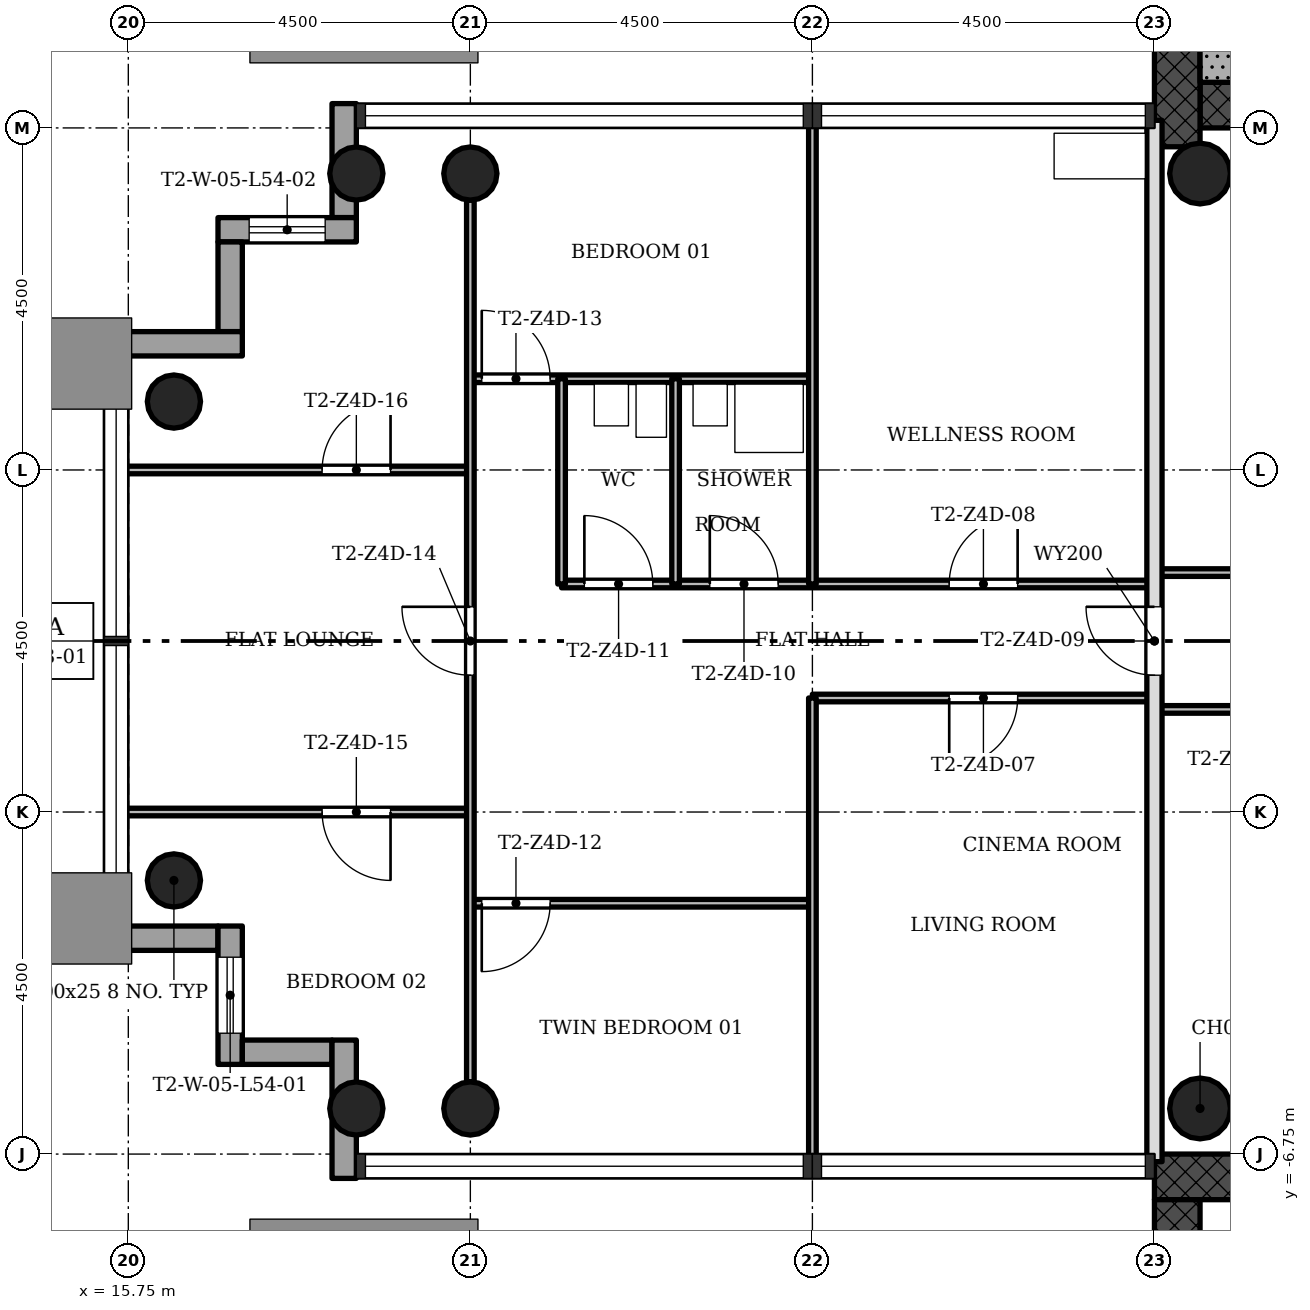
"""IFC4 building model, lengths in metres.
Left out: names, types, materials, properties, quantities, classifications, styles, units other than length and angle.
Written with IfcOpenShell. Run it as: python <this file> out.ifc"""

import sys

from ifc_helpers import new_model, si_unit, direction, frame, frame_2d, origin, origin_2d, place, context, subcontext, project, spatial, rectangle, hollow_circle, extrude, element, fill, save


model = new_model("IFC4")
c1 = context("Model", 3, precision=1e-05, world=origin(), true_north=direction((0.0, 1.0)))
c2 = subcontext(c1, "Body", "Model", "MODEL_VIEW")
j1 = project(units=[si_unit("LENGTHUNIT", "METRE"), si_unit("PLANEANGLEUNIT", "RADIAN")], contexts=[c1])
p1 = place(None, origin())
s1 = spatial("IfcSite", under=j1, at=p1, CompositionType="ELEMENT")
p2 = place(p1, origin())
s2 = spatial("IfcBuilding", under=s1, at=p2, CompositionType="ELEMENT")
p3 = place(p2, frame((0.0, 0.0, 196.0)))
s3 = spatial("IfcBuildingStorey", under=s2, at=p3, CompositionType="ELEMENT", Elevation=196.0)
p4 = place(p3, frame((29.85, 7.05, 0.0), z_axis=(0.0, 0.0, 1.0), x_axis=(1.0, 0.0, 0.0)))
e1 = element("IfcWall", 1, at=p4, inside=s3, PredefinedType="SHEAR", context=c2, shape_type="SweptSolid", body=[
    extrude(rectangle(XDim=12.9, YDim=0.6, at=frame_2d((6.45, 0.0))), origin(), (0.0, 0.0, 1.0), 3.4),
])
p5 = place(p4, frame((5.25, 0.0, 0.0)))
e2 = element("IfcOpeningElement", 2, at=p5, cuts=e1, PredefinedType="OPENING", context=c2, shape_type="SweptSolid", body=[
    extrude(rectangle(XDim=1.8, YDim=2.1, at=frame_2d((0.9, 1.05))), frame((0.0, 0.31, 0.0), z_axis=(0.0, -1.0, 0.0), x_axis=(1.0, 0.0, 0.0)), (0.0, 0.0, 1.0), 0.62),
])
p6 = place(p3, frame((29.55, 15.15, 0.0), z_axis=(0.0, 0.0, 1.0), x_axis=(0.0, -1.0, 0.0)))
e3 = element("IfcWall", 3, at=p6, inside=s3, PredefinedType="SHEAR", context=c2, shape_type="SweptSolid", body=[
    extrude(rectangle(XDim=8.648, YDim=0.6, at=frame_2d((4.324, 0.0))), origin(), (0.0, 0.0, 1.0), 3.4),
])
p7 = place(p3, frame((42.15, -7.05, 0.0), z_axis=(0.0, 0.0, 1.0), x_axis=(-1.0, 0.0, 0.0)))
e4 = element("IfcWall", 4, at=p7, inside=s3, PredefinedType="SHEAR", context=c2, shape_type="SweptSolid", body=[
    extrude(rectangle(XDim=12.9, YDim=0.6, at=frame_2d((6.45, 0.0))), origin(), (0.0, 0.0, 1.0), 3.4),
])
p8 = place(p7, frame((5.25, 0.0, 0.0)))
e5 = element("IfcOpeningElement", 5, at=p8, cuts=e4, PredefinedType="OPENING", context=c2, shape_type="SweptSolid", body=[
    extrude(rectangle(XDim=1.8, YDim=2.1, at=frame_2d((0.9, 1.05))), frame((0.0, 0.31, 0.0), z_axis=(0.0, -1.0, 0.0), x_axis=(1.0, 0.0, 0.0)), (0.0, 0.0, 1.0), 0.62),
])
p9 = place(p3, frame((29.55, -7.35, 0.0), z_axis=(0.0, 0.0, 1.0), x_axis=(0.0, -1.0, 0.0)))
e6 = element("IfcWall", 6, at=p9, inside=s3, PredefinedType="SHEAR", context=c2, shape_type="SweptSolid", body=[
    extrude(rectangle(XDim=8.4, YDim=0.6, at=frame_2d((4.2, 0.0))), origin(), (0.0, 0.0, 1.0), 3.4),
])
for number, where, z_axis, x_axis in (
    (7, (20.25, 6.15, 0.0), (0.0, 0.0, 1.0), (1.0, 0.0, 0.0)),
    (8, (20.25, -6.15, 0.0), (0.0, 0.0, 1.0), (1.0, 0.0, 0.0)),
    (9, (18.75, 6.15, 0.0), (0.0, 0.0, 1.0), (1.0, 0.0, 0.0)),
    (10, (18.75, -6.15, 0.0), (0.0, 0.0, 1.0), (1.0, 0.0, 0.0)),
    (11, (16.35, 3.15, 0.0), (0.0, 0.0, 1.0), (1.0, 0.0, 0.0)),
    (12, (16.35, -3.15, 0.0), (0.0, 0.0, 1.0), (1.0, 0.0, 0.0)),
):
    element("IfcColumn", number, at=place(p3, frame(where, z_axis=z_axis, x_axis=x_axis)), inside=s3, PredefinedType="COLUMN", context=c2, shape_type="SweptSolid", body=[
        extrude(hollow_circle(Radius=0.35, WallThickness=0.025, at=origin_2d()), origin(), (0.0, 0.0, 1.0), 3.4),
    ])
for number, where, z_axis, x_axis in (
    (13, (29.85, 6.15, 0.0), (0.0, 0.0, 1.0), (1.0, 0.0, 0.0)),
    (14, (29.85, -6.15, 0.0), (0.0, 0.0, 1.0), (1.0, 0.0, 0.0)),
):
    element("IfcColumn", number, at=place(p3, frame(where, z_axis=z_axis, x_axis=x_axis)), inside=s3, PredefinedType="COLUMN", context=c2, shape_type="SweptSolid", body=[
        extrude(hollow_circle(Radius=0.4, WallThickness=0.028, at=origin_2d()), origin(), (0.0, 0.0, 1.0), 3.4),
    ])
p10 = place(p3, frame((18.59, 7.07, -0.3), z_axis=(0.0, 0.0, 1.0), x_axis=(0.0, -1.0, 0.0)))
e15 = element("IfcWall", 15, at=p10, inside=s3, PredefinedType="STANDARD", context=c2, shape_type="SweptSolid", body=[
    extrude(rectangle(XDim=1.5, YDim=0.32, at=frame_2d((0.75, 0.0))), origin(), (0.0, 0.0, 1.0), 3.4),
])
p11 = place(p3, frame((18.75, 5.41, -0.3), z_axis=(0.0, 0.0, 1.0), x_axis=(-1.0, 0.0, 0.0)))
e16 = element("IfcWall", 16, at=p11, inside=s3, PredefinedType="STANDARD", context=c2, shape_type="SweptSolid", body=[
    extrude(rectangle(XDim=1.82, YDim=0.32, at=frame_2d((0.91, 0.0))), origin(), (0.0, 0.0, 1.0), 3.4),
])
p12 = place(p11, frame((0.41, 0.0, 1.2)))
e17 = element("IfcOpeningElement", 17, at=p12, cuts=e16, PredefinedType="OPENING", context=c2, shape_type="SweptSolid", body=[
    extrude(rectangle(XDim=1.0, YDim=1.5, at=frame_2d((0.5, 0.75))), frame((0.0, 0.17, 0.0), z_axis=(0.0, -1.0, 0.0), x_axis=(1.0, 0.0, 0.0)), (0.0, 0.0, 1.0), 0.34),
])
p13 = place(p3, frame((17.09, 5.25, -0.3), z_axis=(0.0, 0.0, 1.0), x_axis=(0.0, -1.0, 0.0)))
e18 = element("IfcWall", 18, at=p13, inside=s3, PredefinedType="STANDARD", context=c2, shape_type="SweptSolid", body=[
    extrude(rectangle(XDim=1.18, YDim=0.32, at=frame_2d((0.59, 0.0))), origin(), (0.0, 0.0, 1.0), 3.4),
])
p14 = place(p3, frame((17.25, 3.91, -0.3), z_axis=(0.0, 0.0, 1.0), x_axis=(-1.0, 0.0, 0.0)))
e19 = element("IfcWall", 19, at=p14, inside=s3, PredefinedType="STANDARD", context=c2, shape_type="SweptSolid", body=[
    extrude(rectangle(XDim=1.82, YDim=0.32, at=frame_2d((0.91, 0.0))), origin(), (0.0, 0.0, 1.0), 3.4),
])
p15 = place(p3, frame((15.43, -3.91, -0.3), z_axis=(0.0, 0.0, 1.0), x_axis=(1.0, 0.0, 0.0)))
e20 = element("IfcWall", 20, at=p15, inside=s3, PredefinedType="STANDARD", context=c2, shape_type="SweptSolid", body=[
    extrude(rectangle(XDim=1.5, YDim=0.32, at=frame_2d((0.75, 0.0))), origin(), (0.0, 0.0, 1.0), 3.4),
])
p16 = place(p3, frame((17.09, -3.75, -0.3), z_axis=(0.0, 0.0, 1.0), x_axis=(0.0, -1.0, 0.0)))
e21 = element("IfcWall", 21, at=p16, inside=s3, PredefinedType="STANDARD", context=c2, shape_type="SweptSolid", body=[
    extrude(rectangle(XDim=1.82, YDim=0.32, at=frame_2d((0.91, 0.0))), origin(), (0.0, 0.0, 1.0), 3.4),
])
p17 = place(p16, frame((0.41, 0.0, 1.2)))
e22 = element("IfcOpeningElement", 22, at=p17, cuts=e21, PredefinedType="OPENING", context=c2, shape_type="SweptSolid", body=[
    extrude(rectangle(XDim=1.0, YDim=1.5, at=frame_2d((0.5, 0.75))), frame((0.0, 0.17, 0.0), z_axis=(0.0, -1.0, 0.0), x_axis=(1.0, 0.0, 0.0)), (0.0, 0.0, 1.0), 0.34),
])
p18 = place(p3, frame((17.25, -5.41, -0.3), z_axis=(0.0, 0.0, 1.0), x_axis=(1.0, 0.0, 0.0)))
e23 = element("IfcWall", 23, at=p18, inside=s3, PredefinedType="STANDARD", context=c2, shape_type="SweptSolid", body=[
    extrude(rectangle(XDim=1.18, YDim=0.32, at=frame_2d((0.59, 0.0))), origin(), (0.0, 0.0, 1.0), 3.4),
])
p19 = place(p3, frame((18.59, -5.25, -0.3), z_axis=(0.0, 0.0, 1.0), x_axis=(0.0, -1.0, 0.0)))
e24 = element("IfcWall", 24, at=p19, inside=s3, PredefinedType="STANDARD", context=c2, shape_type="SweptSolid", body=[
    extrude(rectangle(XDim=1.82, YDim=0.32, at=frame_2d((0.91, 0.0))), origin(), (0.0, 0.0, 1.0), 3.4),
])
p20 = place(p3, frame((24.75, -3.45, 0.0), z_axis=(0.0, 0.0, 1.0), x_axis=(-1.0, 0.0, 0.0)))
e25 = element("IfcWall", 25, at=p20, inside=s3, PredefinedType="PARTITIONING", context=c2, shape_type="SweptSolid", body=[
    extrude(rectangle(XDim=4.5, YDim=0.1, at=frame_2d((2.25, 0.0))), origin(), (0.0, 0.0, 1.0), 3.0),
])
p21 = place(p20, frame((3.45, 0.0, 0.0)))
e26 = element("IfcOpeningElement", 26, at=p21, cuts=e25, PredefinedType="OPENING", context=c2, shape_type="SweptSolid", body=[
    extrude(rectangle(XDim=0.9, YDim=2.1, at=frame_2d((0.45, 1.05))), frame((0.0, 0.06, 0.0), z_axis=(0.0, -1.0, 0.0), x_axis=(1.0, 0.0, 0.0)), (0.0, 0.0, 1.0), 0.12),
])
p22 = place(p3, frame((20.25, -2.25, 0.0), z_axis=(0.0, 0.0, 1.0), x_axis=(-1.0, 0.0, 0.0)))
e27 = element("IfcWall", 27, at=p22, inside=s3, PredefinedType="PARTITIONING", context=c2, shape_type="SweptSolid", body=[
    extrude(rectangle(XDim=4.6, YDim=0.1, at=frame_2d((2.3, 0.0))), origin(), (0.0, 0.0, 1.0), 3.0),
])
p23 = place(p22, frame((1.05, 0.0, 0.0)))
e28 = element("IfcOpeningElement", 28, at=p23, cuts=e27, PredefinedType="OPENING", context=c2, shape_type="SweptSolid", body=[
    extrude(rectangle(XDim=0.9, YDim=2.1, at=frame_2d((0.45, 1.05))), frame((0.0, 0.06, 0.0), z_axis=(0.0, -1.0, 0.0), x_axis=(1.0, 0.0, 0.0)), (0.0, 0.0, 1.0), 0.12),
])
p24 = place(p3, frame((31.5, -0.9, 0.0), z_axis=(0.0, 0.0, 1.0), x_axis=(-1.0, 0.0, 0.0)))
e29 = element("IfcWall", 29, at=p24, inside=s3, PredefinedType="PARTITIONING", context=c2, shape_type="SweptSolid", body=[
    extrude(rectangle(XDim=2.25, YDim=0.1, at=frame_2d((1.125, 0.0))), origin(), (0.0, 0.0, 1.0), 3.0),
])
p25 = place(p3, frame((29.25, -0.75, 0.0), z_axis=(0.0, 0.0, 1.0), x_axis=(-1.0, 0.0, 0.0)))
e30 = element("IfcWall", 30, at=p25, inside=s3, PredefinedType="PARTITIONING", context=c2, shape_type="SweptSolid", body=[
    extrude(rectangle(XDim=4.5, YDim=0.1, at=frame_2d((2.25, 0.0))), origin(), (0.0, 0.0, 1.0), 3.0),
])
p26 = place(p25, frame((1.8, 0.0, 0.0)))
e31 = element("IfcOpeningElement", 31, at=p26, cuts=e30, PredefinedType="OPENING", context=c2, shape_type="SweptSolid", body=[
    extrude(rectangle(XDim=0.9, YDim=2.1, at=frame_2d((0.45, 1.05))), frame((0.0, 0.06, 0.0), z_axis=(0.0, -1.0, 0.0), x_axis=(1.0, 0.0, 0.0)), (0.0, 0.0, 1.0), 0.12),
])
p27 = place(p3, frame((29.25, 0.75, 0.0), z_axis=(0.0, 0.0, 1.0), x_axis=(-1.0, 0.0, 0.0)))
e32 = element("IfcWall", 32, at=p27, inside=s3, PredefinedType="PARTITIONING", context=c2, shape_type="SweptSolid", body=[
    extrude(rectangle(XDim=7.8, YDim=0.1, at=frame_2d((3.9, 0.0))), origin(), (0.0, 0.0, 1.0), 3.0),
])
p28 = place(p27, frame((1.8, 0.0, 0.0)))
e33 = element("IfcOpeningElement", 33, at=p28, cuts=e32, PredefinedType="OPENING", context=c2, shape_type="SweptSolid", body=[
    extrude(rectangle(XDim=0.9, YDim=2.1, at=frame_2d((0.45, 1.05))), frame((0.0, 0.06, 0.0), z_axis=(0.0, -1.0, 0.0), x_axis=(1.0, 0.0, 0.0)), (0.0, 0.0, 1.0), 0.12),
])
p29 = place(p27, frame((4.95, 0.0, 0.0)))
e34 = element("IfcOpeningElement", 34, at=p29, cuts=e32, PredefinedType="OPENING", context=c2, shape_type="SweptSolid", body=[
    extrude(rectangle(XDim=0.9, YDim=2.1, at=frame_2d((0.45, 1.05))), frame((0.0, 0.06, 0.0), z_axis=(0.0, -1.0, 0.0), x_axis=(1.0, 0.0, 0.0)), (0.0, 0.0, 1.0), 0.12),
])
p30 = place(p27, frame((6.6, 0.0, 0.0)))
e35 = element("IfcOpeningElement", 35, at=p30, cuts=e32, PredefinedType="OPENING", context=c2, shape_type="SweptSolid", body=[
    extrude(rectangle(XDim=0.9, YDim=2.1, at=frame_2d((0.45, 1.05))), frame((0.0, 0.06, 0.0), z_axis=(0.0, -1.0, 0.0), x_axis=(1.0, 0.0, 0.0)), (0.0, 0.0, 1.0), 0.12),
])
p31 = place(p3, frame((31.5, 0.9, 0.0), z_axis=(0.0, 0.0, 1.0), x_axis=(-1.0, 0.0, 0.0)))
e36 = element("IfcWall", 36, at=p31, inside=s3, PredefinedType="PARTITIONING", context=c2, shape_type="SweptSolid", body=[
    extrude(rectangle(XDim=2.25, YDim=0.1, at=frame_2d((1.125, 0.0))), origin(), (0.0, 0.0, 1.0), 3.0),
])
p32 = place(p3, frame((20.25, 2.25, 0.0), z_axis=(0.0, 0.0, 1.0), x_axis=(-1.0, 0.0, 0.0)))
e37 = element("IfcWall", 37, at=p32, inside=s3, PredefinedType="PARTITIONING", context=c2, shape_type="SweptSolid", body=[
    extrude(rectangle(XDim=4.6, YDim=0.1, at=frame_2d((2.3, 0.0))), origin(), (0.0, 0.0, 1.0), 3.0),
])
p33 = place(p32, frame((1.05, 0.0, 0.0)))
e38 = element("IfcOpeningElement", 38, at=p33, cuts=e37, PredefinedType="OPENING", context=c2, shape_type="SweptSolid", body=[
    extrude(rectangle(XDim=0.9, YDim=2.1, at=frame_2d((0.45, 1.05))), frame((0.0, 0.06, 0.0), z_axis=(0.0, -1.0, 0.0), x_axis=(1.0, 0.0, 0.0)), (0.0, 0.0, 1.0), 0.12),
])
p34 = place(p3, frame((24.75, 3.45, 0.0), z_axis=(0.0, 0.0, 1.0), x_axis=(-1.0, 0.0, 0.0)))
e39 = element("IfcWall", 39, at=p34, inside=s3, PredefinedType="PARTITIONING", context=c2, shape_type="SweptSolid", body=[
    extrude(rectangle(XDim=4.5, YDim=0.1, at=frame_2d((2.25, 0.0))), origin(), (0.0, 0.0, 1.0), 3.0),
])
p35 = place(p34, frame((3.45, 0.0, 0.0)))
e40 = element("IfcOpeningElement", 40, at=p35, cuts=e39, PredefinedType="OPENING", context=c2, shape_type="SweptSolid", body=[
    extrude(rectangle(XDim=0.9, YDim=2.1, at=frame_2d((0.45, 1.05))), frame((0.0, 0.06, 0.0), z_axis=(0.0, -1.0, 0.0), x_axis=(1.0, 0.0, 0.0)), (0.0, 0.0, 1.0), 0.12),
])
p36 = place(p3, frame((29.25, -6.85, 0.0), z_axis=(0.0, 0.0, 1.0), x_axis=(0.0, 1.0, 0.0)))
e41 = element("IfcWall", 41, at=p36, inside=s3, PredefinedType="SOLIDWALL", context=c2, shape_type="SweptSolid", body=[
    extrude(rectangle(XDim=13.7, YDim=0.2, at=frame_2d((6.85, 0.0))), origin(), (0.0, 0.0, 1.0), 3.0),
])
p37 = place(p36, frame((6.4, 0.0, 0.0)))
e42 = element("IfcOpeningElement", 42, at=p37, cuts=e41, PredefinedType="OPENING", context=c2, shape_type="SweptSolid", body=[
    extrude(rectangle(XDim=0.9, YDim=2.1, at=frame_2d((0.45, 1.05))), frame((0.0, 0.11, 0.0), z_axis=(0.0, -1.0, 0.0), x_axis=(1.0, 0.0, 0.0)), (0.0, 0.0, 1.0), 0.22),
])
for number, where, z_axis, x_axis in (
    (43, (24.75, -6.85, 0.0), (0.0, 0.0, 1.0), (0.0, 1.0, 0.0)),
    (44, (24.75, 0.75, 0.0), (0.0, 0.0, 1.0), (0.0, 1.0, 0.0)),
):
    element("IfcWall", number, at=place(p3, frame(where, z_axis=z_axis, x_axis=x_axis)), inside=s3, PredefinedType="PARTITIONING", context=c2, shape_type="SweptSolid", body=[
        extrude(rectangle(XDim=6.1, YDim=0.1, at=frame_2d((3.05, 0.0))), origin(), (0.0, 0.0, 1.0), 3.0),
    ])
for number, where, z_axis, x_axis in (
    (45, (22.95, 0.75, 0.0), (0.0, 0.0, 1.0), (0.0, 1.0, 0.0)),
    (46, (21.45, 0.75, 0.0), (0.0, 0.0, 1.0), (0.0, 1.0, 0.0)),
):
    element("IfcWall", number, at=place(p3, frame(where, z_axis=z_axis, x_axis=x_axis)), inside=s3, PredefinedType="PARTITIONING", context=c2, shape_type="SweptSolid", body=[
        extrude(rectangle(XDim=2.7, YDim=0.1, at=frame_2d((1.35, 0.0))), origin(), (0.0, 0.0, 1.0), 3.0),
    ])
p38 = place(p3, frame((20.25, -5.8, 0.0), z_axis=(0.0, 0.0, 1.0), x_axis=(0.0, 1.0, 0.0)))
e47 = element("IfcWall", 47, at=p38, inside=s3, PredefinedType="PARTITIONING", context=c2, shape_type="SweptSolid", body=[
    extrude(rectangle(XDim=11.6, YDim=0.1, at=frame_2d((5.8, 0.0))), origin(), (0.0, 0.0, 1.0), 3.0),
])
p39 = place(p38, frame((5.35, 0.0, 0.0)))
e48 = element("IfcOpeningElement", 48, at=p39, cuts=e47, PredefinedType="OPENING", context=c2, shape_type="SweptSolid", body=[
    extrude(rectangle(XDim=0.9, YDim=2.1, at=frame_2d((0.45, 1.05))), frame((0.0, 0.06, 0.0), z_axis=(0.0, -1.0, 0.0), x_axis=(1.0, 0.0, 0.0)), (0.0, 0.0, 1.0), 0.12),
])
p40 = place(p3, frame((34.15, 7.65, 0.0), z_axis=(0.0, 0.0, 1.0), x_axis=(-1.0, 0.0, 0.0)))
e49 = element("IfcWall", 49, at=p40, inside=s3, PredefinedType="SHEAR", context=c2, shape_type="SweptSolid", body=[
    extrude(rectangle(XDim=4.3, YDim=0.6, at=frame_2d((2.15, 0.0))), origin(), (0.0, 0.0, 1.0), 3.4),
])
p41 = place(p26, origin())
e50 = element("IfcDoor", 50, at=p41, inside=s3, OperationType="SINGLE_SWING_LEFT", PredefinedType="DOOR", context=c2, shape_type="SweptSolid", body=[
    extrude(rectangle(XDim=0.9, YDim=2.1, at=frame_2d((0.45, 1.05))), frame((0.0, 0.025, 0.0), z_axis=(0.0, -1.0, 0.0), x_axis=(1.0, 0.0, 0.0)), (0.0, 0.0, 1.0), 0.05),
])
fill(e31, e50)
p42 = place(p28, origin())
e51 = element("IfcDoor", 51, at=p42, inside=s3, OperationType="SINGLE_SWING_LEFT", PredefinedType="DOOR", context=c2, shape_type="SweptSolid", body=[
    extrude(rectangle(XDim=0.9, YDim=2.1, at=frame_2d((0.45, 1.05))), frame((0.0, 0.025, 0.0), z_axis=(0.0, -1.0, 0.0), x_axis=(1.0, 0.0, 0.0)), (0.0, 0.0, 1.0), 0.05),
])
fill(e33, e51)
p43 = place(p37, origin())
e52 = element("IfcDoor", 52, at=p43, inside=s3, OperationType="SINGLE_SWING_LEFT", PredefinedType="DOOR", context=c2, shape_type="SweptSolid", body=[
    extrude(rectangle(XDim=0.9, YDim=2.1, at=frame_2d((0.45, 1.05))), frame((0.0, 0.025, 0.0), z_axis=(0.0, -1.0, 0.0), x_axis=(1.0, 0.0, 0.0)), (0.0, 0.0, 1.0), 0.05),
])
fill(e42, e52)
p44 = place(p29, origin())
e53 = element("IfcDoor", 53, at=p44, inside=s3, OperationType="SINGLE_SWING_RIGHT", PredefinedType="DOOR", context=c2, shape_type="SweptSolid", body=[
    extrude(rectangle(XDim=0.9, YDim=2.1, at=frame_2d((0.45, 1.05))), frame((0.0, 0.025, 0.0), z_axis=(0.0, -1.0, 0.0), x_axis=(1.0, 0.0, 0.0)), (0.0, 0.0, 1.0), 0.05),
])
fill(e34, e53)
p45 = place(p30, origin())
e54 = element("IfcDoor", 54, at=p45, inside=s3, OperationType="SINGLE_SWING_RIGHT", PredefinedType="DOOR", context=c2, shape_type="SweptSolid", body=[
    extrude(rectangle(XDim=0.9, YDim=2.1, at=frame_2d((0.45, 1.05))), frame((0.0, 0.025, 0.0), z_axis=(0.0, -1.0, 0.0), x_axis=(1.0, 0.0, 0.0)), (0.0, 0.0, 1.0), 0.05),
])
fill(e35, e54)
p46 = place(p21, origin())
e55 = element("IfcDoor", 55, at=p46, inside=s3, OperationType="SINGLE_SWING_LEFT", PredefinedType="DOOR", context=c2, shape_type="SweptSolid", body=[
    extrude(rectangle(XDim=0.9, YDim=2.1, at=frame_2d((0.45, 1.05))), frame((0.0, 0.025, 0.0), z_axis=(0.0, -1.0, 0.0), x_axis=(1.0, 0.0, 0.0)), (0.0, 0.0, 1.0), 0.05),
])
fill(e26, e55)
p47 = place(p35, origin())
e56 = element("IfcDoor", 56, at=p47, inside=s3, OperationType="SINGLE_SWING_RIGHT", PredefinedType="DOOR", context=c2, shape_type="SweptSolid", body=[
    extrude(rectangle(XDim=0.9, YDim=2.1, at=frame_2d((0.45, 1.05))), frame((0.0, 0.025, 0.0), z_axis=(0.0, -1.0, 0.0), x_axis=(1.0, 0.0, 0.0)), (0.0, 0.0, 1.0), 0.05),
])
fill(e40, e56)
p48 = place(p39, origin())
e57 = element("IfcDoor", 57, at=p48, inside=s3, OperationType="SINGLE_SWING_LEFT", PredefinedType="DOOR", context=c2, shape_type="SweptSolid", body=[
    extrude(rectangle(XDim=0.9, YDim=2.1, at=frame_2d((0.45, 1.05))), frame((0.0, 0.025, 0.0), z_axis=(0.0, -1.0, 0.0), x_axis=(1.0, 0.0, 0.0)), (0.0, 0.0, 1.0), 0.05),
])
fill(e48, e57)
p49 = place(p23, origin())
e58 = element("IfcDoor", 58, at=p49, inside=s3, OperationType="SINGLE_SWING_RIGHT", PredefinedType="DOOR", context=c2, shape_type="SweptSolid", body=[
    extrude(rectangle(XDim=0.9, YDim=2.1, at=frame_2d((0.45, 1.05))), frame((0.0, 0.025, 0.0), z_axis=(0.0, -1.0, 0.0), x_axis=(1.0, 0.0, 0.0)), (0.0, 0.0, 1.0), 0.05),
])
fill(e28, e58)
p50 = place(p33, origin())
e59 = element("IfcDoor", 59, at=p50, inside=s3, OperationType="SINGLE_SWING_LEFT", PredefinedType="DOOR", context=c2, shape_type="SweptSolid", body=[
    extrude(rectangle(XDim=0.9, YDim=2.1, at=frame_2d((0.45, 1.05))), frame((0.0, 0.025, 0.0), z_axis=(0.0, -1.0, 0.0), x_axis=(1.0, 0.0, 0.0)), (0.0, 0.0, 1.0), 0.05),
])
fill(e38, e59)
p51 = place(p17, origin())
e60 = element("IfcWindow", 60, at=p51, inside=s3, PartitioningType="SINGLE_PANEL", PredefinedType="WINDOW", context=c2, shape_type="SweptSolid", body=[
    extrude(rectangle(XDim=1.0, YDim=1.5, at=frame_2d((0.5, 0.75))), frame((0.0, 0.03, 0.0), z_axis=(0.0, -1.0, 0.0), x_axis=(1.0, 0.0, 0.0)), (0.0, 0.0, 1.0), 0.06),
])
fill(e22, e60)
p52 = place(p12, origin())
e61 = element("IfcWindow", 61, at=p52, inside=s3, PartitioningType="SINGLE_PANEL", PredefinedType="WINDOW", context=c2, shape_type="SweptSolid", body=[
    extrude(rectangle(XDim=1.0, YDim=1.5, at=frame_2d((0.5, 0.75))), frame((0.0, 0.03, 0.0), z_axis=(0.0, -1.0, 0.0), x_axis=(1.0, 0.0, 0.0)), (0.0, 0.0, 1.0), 0.06),
])
fill(e17, e61)
save(model, sys.argv[1])
